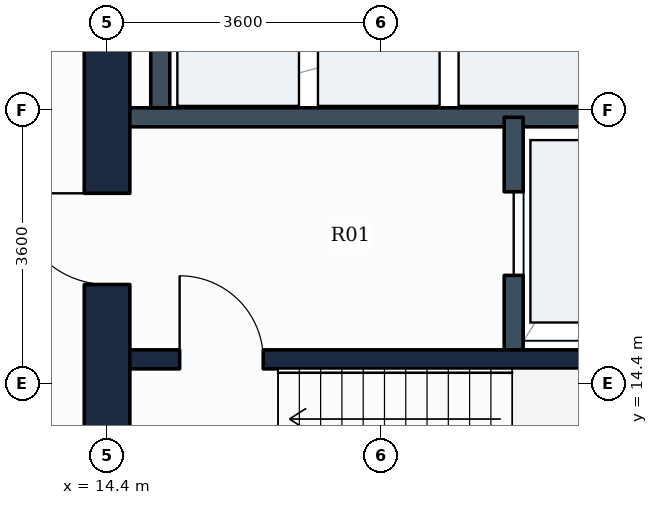
"""IFC4 building model, lengths in metres.
Left out: names, types, materials, properties, quantities, classifications, styles, units other than length and angle.
Written with IfcOpenShell. Run it as: python <this file> out.ifc"""

import sys

from ifc_helpers import new_model, si_unit, direction, frame, frame_2d, origin, place, context, subcontext, project, spatial, rectangle, extrude, element, fill, save


model = new_model("IFC4")
c1 = context("Model", 3, precision=1e-05, world=origin(), true_north=direction((0.0, 1.0)))
c2 = subcontext(c1, "Body", "Model", "MODEL_VIEW")
j1 = project(units=[si_unit("LENGTHUNIT", "METRE"), si_unit("PLANEANGLEUNIT", "RADIAN")], contexts=[c1])
p1 = place(None, origin())
s1 = spatial("IfcSite", under=j1, at=p1, CompositionType="ELEMENT")
p2 = place(p1, origin())
s2 = spatial("IfcBuilding", under=s1, at=p2, CompositionType="ELEMENT")
p3 = place(p2, frame((0.0, 0.0, 31.8)))
s3 = spatial("IfcBuildingStorey", under=s2, at=p3, CompositionType="ELEMENT", Elevation=31.8)
p4 = place(p3, frame((14.4, 10.8, 0.0), z_axis=(0.0, 0.0, 1.0), x_axis=(0.0, 1.0, 0.0)))
e1 = element("IfcWall", 1, at=p4, inside=s3, PredefinedType="SHEAR", context=c2, shape_type="SweptSolid", body=[
    extrude(rectangle(XDim=14.4, YDim=0.6, at=frame_2d((7.2, 0.0))), origin(), (0.0, 0.0, 1.0), 3.65),
])
p5 = place(p4, frame((11.05, 0.0, 0.0)))
e2 = element("IfcOpeningElement", 2, at=p5, cuts=e1, PredefinedType="OPENING", context=c2, shape_type="SweptSolid", body=[
    extrude(rectangle(XDim=1.1, YDim=2.1, at=frame_2d((0.55, 1.05))), frame((0.0, 0.31, 0.0), z_axis=(0.0, -1.0, 0.0), x_axis=(1.0, 0.0, 0.0)), (0.0, 0.0, 1.0), 0.62),
])
p6 = place(p4, frame((4.9, 0.0, 0.0)))
e3 = element("IfcOpeningElement", 3, at=p6, cuts=e1, PredefinedType="OPENING", context=c2, shape_type="SweptSolid", body=[
    extrude(rectangle(XDim=1.2, YDim=2.1, at=frame_2d((0.6, 1.05))), frame((0.0, 0.31, 0.0), z_axis=(0.0, -1.0, 0.0), x_axis=(1.0, 0.0, 0.0)), (0.0, 0.0, 1.0), 0.62),
])
p7 = place(p3, frame((14.7, 14.715, 0.0), z_axis=(0.0, 0.0, 1.0), x_axis=(1.0, 0.0, 0.0)))
e4 = element("IfcWall", 4, at=p7, inside=s3, PredefinedType="SHEAR", context=c2, shape_type="SweptSolid", body=[
    extrude(rectangle(XDim=8.65, YDim=0.25, at=frame_2d((4.325, 0.0))), origin(), (0.0, 0.0, 1.0), 3.65),
])
p8 = place(p7, frame((0.655, 0.0, 0.0)))
e5 = element("IfcOpeningElement", 5, at=p8, cuts=e4, PredefinedType="OPENING", context=c2, shape_type="SweptSolid", body=[
    extrude(rectangle(XDim=1.1, YDim=2.1, at=frame_2d((0.55, 1.05))), frame((0.0, 0.135, 0.0), z_axis=(0.0, -1.0, 0.0), x_axis=(1.0, 0.0, 0.0)), (0.0, 0.0, 1.0), 0.27),
])
p9 = place(p3, frame((14.65, 17.9, 0.0), z_axis=(0.0, 0.0, 1.0), x_axis=(1.0, 0.0, 0.0)))
e6 = element("IfcWall", 6, at=p9, inside=s3, PredefinedType="PARTITIONING", context=c2, shape_type="SweptSolid", body=[
    extrude(rectangle(XDim=7.15, YDim=0.25, at=frame_2d((3.575, 0.0))), origin(), (0.0, 0.0, 1.0), 3.635),
])
p10 = place(p3, frame((19.75, 14.84, 0.0), z_axis=(0.0, 0.0, 1.0), x_axis=(0.0, 1.0, 0.0)))
e7 = element("IfcWall", 7, at=p10, inside=s3, PredefinedType="PARTITIONING", context=c2, shape_type="SweptSolid", body=[
    extrude(rectangle(XDim=3.06, YDim=0.25, at=frame_2d((1.53, 0.0))), origin(), (0.0, 0.0, 1.0), 3.635),
])
p11 = place(p10, frame((0.98, 0.0, 0.0)))
e8 = element("IfcOpeningElement", 8, at=p11, cuts=e7, PredefinedType="OPENING", context=c2, shape_type="SweptSolid", body=[
    extrude(rectangle(XDim=1.1, YDim=2.1, at=frame_2d((0.55, 1.05))), frame((0.0, 0.135, 0.0), z_axis=(0.0, -1.0, 0.0), x_axis=(1.0, 0.0, 0.0)), (0.0, 0.0, 1.0), 0.27),
])
p12 = place(p3, frame((15.1, 18.025, 0.0), z_axis=(0.0, 0.0, 1.0), x_axis=(0.0, 1.0, 0.0)))
e9 = element("IfcWall", 9, at=p12, inside=s3, PredefinedType="PARTITIONING", context=c2, shape_type="SweptSolid", body=[
    extrude(rectangle(XDim=1.975, YDim=0.25, at=frame_2d((0.988, 0.0))), origin(), (0.0, 0.0, 1.0), 3.635),
])
p13 = place(p8, origin())
e10 = element("IfcDoor", 10, at=p13, inside=s3, OperationType="SINGLE_SWING_LEFT", PredefinedType="DOOR", context=c2, shape_type="SweptSolid", body=[
    extrude(rectangle(XDim=1.1, YDim=2.1, at=frame_2d((0.55, 1.05))), frame((0.0, 0.025, 0.0), z_axis=(0.0, -1.0, 0.0), x_axis=(1.0, 0.0, 0.0)), (0.0, 0.0, 1.0), 0.05),
])
fill(e5, e10)
p14 = place(p11, origin())
e11 = element("IfcDoor", 11, at=p14, inside=s3, OperationType="SLIDING_TO_LEFT", PredefinedType="DOOR", context=c2, shape_type="SweptSolid", body=[
    extrude(rectangle(XDim=1.1, YDim=2.1, at=frame_2d((0.55, 1.05))), frame((0.0, 0.025, 0.0), z_axis=(0.0, -1.0, 0.0), x_axis=(1.0, 0.0, 0.0)), (0.0, 0.0, 1.0), 0.05),
])
fill(e8, e11)
p15 = place(p6, origin())
e12 = element("IfcDoor", 12, at=p15, inside=s3, OperationType="SINGLE_SWING_RIGHT", PredefinedType="DOOR", context=c2, shape_type="SweptSolid", body=[
    extrude(rectangle(XDim=1.2, YDim=2.1, at=frame_2d((0.6, 1.05))), frame((0.0, 0.025, 0.0), z_axis=(0.0, -1.0, 0.0), x_axis=(1.0, 0.0, 0.0)), (0.0, 0.0, 1.0), 0.05),
])
fill(e3, e12)
save(model, sys.argv[1])
